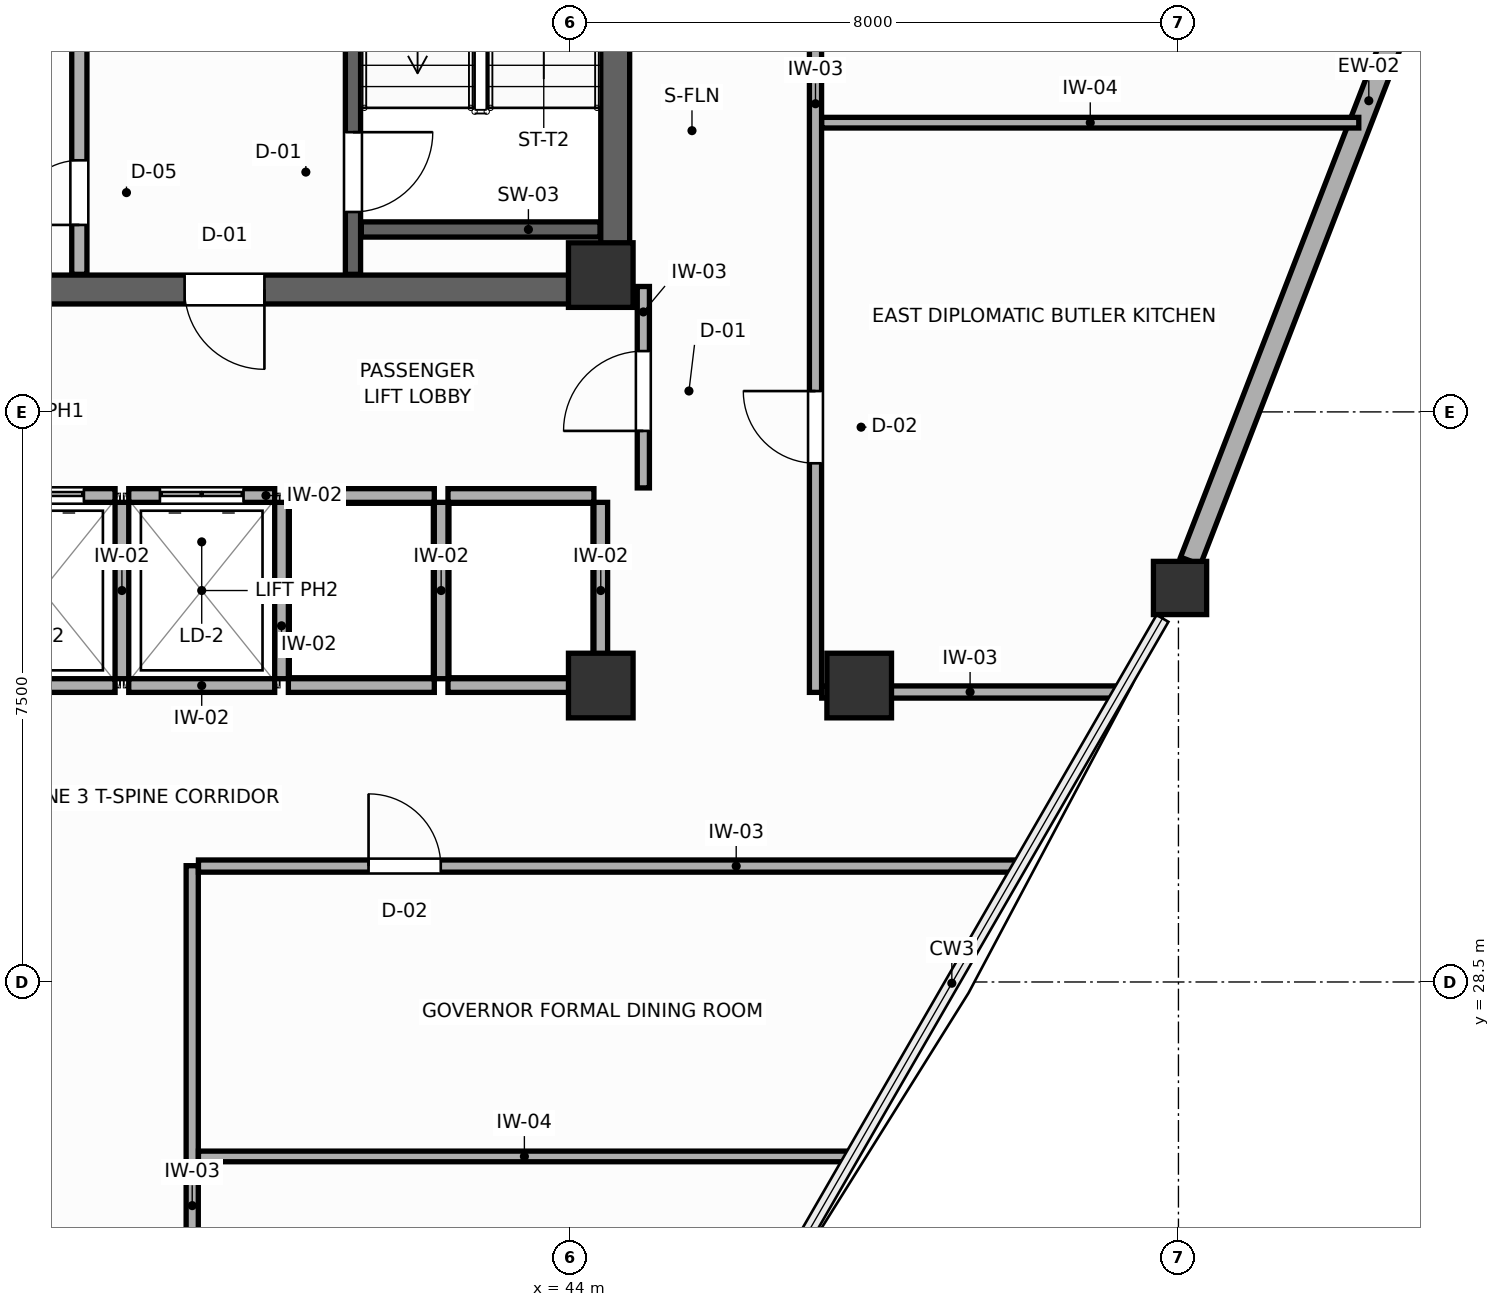
"""IFC4 building model, lengths in metres.
Left out: names, types, materials, properties, quantities, classifications, styles, units other than length and angle.
Written with IfcOpenShell. Run it as: python <this file> out.ifc"""

import sys

from ifc_helpers import new_model, si_unit, direction, frame, frame_2d, origin, origin_2d, place, context, subcontext, project, spatial, rectangle, extrude, source, transform, mapped, element, fill, save


model = new_model("IFC4")
c1 = context("Model", 3, precision=1e-05, world=origin(), true_north=direction((0.0, 1.0)))
c2 = subcontext(c1, "Body", "Model", "MODEL_VIEW")
j1 = project(units=[si_unit("LENGTHUNIT", "METRE"), si_unit("PLANEANGLEUNIT", "RADIAN")], contexts=[c1])
p1 = place(None, origin())
s1 = spatial("IfcSite", under=j1, at=p1, CompositionType="ELEMENT")
p2 = place(p1, origin())
s2 = spatial("IfcBuilding", under=s1, at=p2, CompositionType="ELEMENT")
p3 = place(p2, frame((0.0, 0.0, 250.2)))
s3 = spatial("IfcBuildingStorey", under=s2, at=p3, CompositionType="ELEMENT", Elevation=250.2)
p4 = place(p3, frame((27.22, 37.61, 0.0), z_axis=(0.0, 0.0, 1.0), x_axis=(1.0, 0.0, 0.0)))
e1 = element("IfcWall", 1, at=p4, inside=s3, PredefinedType="SHEAR", context=c2, shape_type="SweptSolid", body=[
    extrude(rectangle(XDim=17.56, YDim=0.38, at=frame_2d((8.78, 0.0))), origin(), (0.0, 0.0, 1.0), 3.6),
])
p5 = place(p4, frame((4.805, 0.0, 0.0)))
e2 = element("IfcOpeningElement", 2, at=p5, cuts=e1, PredefinedType="OPENING", context=c2, shape_type="SweptSolid", body=[
    extrude(rectangle(XDim=1.05, YDim=2.1, at=frame_2d((0.525, 1.05))), frame((0.0, 0.2, 0.0), z_axis=(0.0, -1.0, 0.0), x_axis=(1.0, 0.0, 0.0)), (0.0, 0.0, 1.0), 0.4),
])
p6 = place(p4, frame((11.705, 0.0, 0.0)))
e3 = element("IfcOpeningElement", 3, at=p6, cuts=e1, PredefinedType="OPENING", context=c2, shape_type="SweptSolid", body=[
    extrude(rectangle(XDim=1.05, YDim=2.1, at=frame_2d((0.525, 1.05))), frame((0.0, 0.2, 0.0), z_axis=(0.0, -1.0, 0.0), x_axis=(1.0, 0.0, 0.0)), (0.0, 0.0, 1.0), 0.4),
])
p7 = place(p3, frame((44.59, 37.8, 0.0), z_axis=(0.0, 0.0, 1.0), x_axis=(0.0, 1.0, 0.0)))
e4 = element("IfcWall", 4, at=p7, inside=s3, PredefinedType="SHEAR", context=c2, shape_type="SweptSolid", body=[
    extrude(rectangle(XDim=9.0, YDim=0.38, at=frame_2d((4.5, 0.0))), origin(), (0.0, 0.0, 1.0), 3.6),
])
m1 = source(origin(), c2, "Body", "SweptSolid", [
    extrude(rectangle(XDim=0.85, YDim=0.85, at=origin_2d()), origin(), (0.0, 0.0, 1.0), 3.6),
])
for number, where, z_axis, x_axis in (
    (5, (44.4, 37.8, 0.0), (0.0, 0.0, 1.0), (1.0, 0.0, 0.0)),
    (6, (44.4, 32.4, 0.0), (0.0, 0.0, 1.0), (1.0, 0.0, 0.0)),
    (7, (47.8, 32.4, 0.0), (0.0, 0.0, 1.0), (1.0, 0.0, 0.0)),
):
    element("IfcColumn", number, at=place(p3, frame(where, z_axis=z_axis, x_axis=x_axis)), inside=s3, PredefinedType="COLUMN", context=c2, shape_type="MappedRepresentation", body=[
        mapped(m1, transform((0.0, 0.0, 0.0), scale=1.0)),
    ])
m2 = source(origin(), c2, "Body", "SweptSolid", [
    extrude(rectangle(XDim=0.7, YDim=0.7, at=origin_2d()), origin(), (0.0, 0.0, 1.0), 3.6),
])
p8 = place(p3, frame((52.021, 33.684, 0.0), z_axis=(0.0, 0.0, 1.0), x_axis=(1.0, 0.0, 0.0)))
e8 = element("IfcColumn", 8, at=p8, inside=s3, PredefinedType="COLUMN", context=c2, shape_type="MappedRepresentation", body=[
    mapped(m2, transform((0.0, 0.0, 0.0), scale=1.0)),
])
p9 = place(p3, frame((52.158, 34.039, 0.0), z_axis=(0.0, 0.0, 1.0), x_axis=(0.361269378379, 0.93246149317, 0.0)))
e9 = element("IfcWall", 9, at=p9, inside=s3, PredefinedType="SOLIDWALL", context=c2, shape_type="SweptSolid", body=[
    extrude(rectangle(XDim=12.987, YDim=0.28, at=frame_2d((6.494, 0.0))), origin(), (0.0, 0.0, 1.0), 1.88),
])
p10 = place(p3, frame((41.14, 37.81, 0.0), z_axis=(0.0, 0.0, 1.0), x_axis=(0.0, 1.0, 0.0)))
e10 = element("IfcWall", 10, at=p10, inside=s3, PredefinedType="SHEAR", context=c2, shape_type="SweptSolid", body=[
    extrude(rectangle(XDim=8.98, YDim=0.2, at=frame_2d((4.49, 0.0))), origin(), (0.0, 0.0, 1.0), 3.6),
])
p11 = place(p10, frame((0.82, 0.0, 0.0)))
e11 = element("IfcOpeningElement", 11, at=p11, cuts=e10, PredefinedType="OPENING", context=c2, shape_type="SweptSolid", body=[
    extrude(rectangle(XDim=1.05, YDim=2.1, at=frame_2d((0.525, 1.05))), frame((0.0, 0.11, 0.0), z_axis=(0.0, -1.0, 0.0), x_axis=(1.0, 0.0, 0.0)), (0.0, 0.0, 1.0), 0.22),
])
p12 = place(p3, frame((41.25, 38.4, 0.0), z_axis=(0.0, 0.0, 1.0), x_axis=(1.0, 0.0, 0.0)))
e12 = element("IfcWall", 12, at=p12, inside=s3, PredefinedType="SHEAR", context=c2, shape_type="SweptSolid", body=[
    extrude(rectangle(XDim=3.14, YDim=0.2, at=frame_2d((1.57, 0.0))), origin(), (0.0, 0.0, 1.0), 3.6),
])
p13 = place(p3, frame((37.54, 37.81, 0.0), z_axis=(0.0, 0.0, 1.0), x_axis=(0.0, 1.0, 0.0)))
e13 = element("IfcWall", 13, at=p13, inside=s3, PredefinedType="PARTITIONING", context=c2, shape_type="SweptSolid", body=[
    extrude(rectangle(XDim=8.98, YDim=0.2, at=frame_2d((4.49, 0.0))), origin(), (0.0, 0.0, 1.0), 3.41),
])
p14 = place(p13, frame((0.65, 0.0, 0.0)))
e14 = element("IfcOpeningElement", 14, at=p14, cuts=e13, PredefinedType="OPENING", context=c2, shape_type="SweptSolid", body=[
    extrude(rectangle(XDim=0.85, YDim=2.05, at=frame_2d((0.425, 1.025))), frame((0.0, 0.11, 0.0), z_axis=(0.0, -1.0, 0.0), x_axis=(1.0, 0.0, 0.0)), (0.0, 0.0, 1.0), 0.22),
])
p15 = place(p3, frame((36.09, 34.9, 0.0), z_axis=(0.0, 0.0, 1.0), x_axis=(1.0, 0.0, 0.0)))
e15 = element("IfcWall", 15, at=p15, inside=s3, PredefinedType="PARTITIONING", context=c2, shape_type="SweptSolid", body=[
    extrude(rectangle(XDim=1.92, YDim=0.18, at=frame_2d((0.96, 0.0))), origin(), (0.0, 0.0, 1.0), 3.41),
])
p16 = place(p15, frame((0.41, 0.0, 0.0)))
e16 = element("IfcOpeningElement", 16, at=p16, cuts=e15, PredefinedType="OPENING", context=c2, shape_type="SweptSolid", body=[
    extrude(rectangle(XDim=1.1, YDim=2.1, at=frame_2d((0.55, 1.05))), frame((0.0, 0.1, 0.0), z_axis=(0.0, -1.0, 0.0), x_axis=(1.0, 0.0, 0.0)), (0.0, 0.0, 1.0), 0.2),
])
p17 = place(p3, frame((36.09, 32.4, 0.0), z_axis=(0.0, 0.0, 1.0), x_axis=(1.0, 0.0, 0.0)))
e17 = element("IfcWall", 17, at=p17, inside=s3, PredefinedType="PARTITIONING", context=c2, shape_type="SweptSolid", body=[
    extrude(rectangle(XDim=1.92, YDim=0.18, at=frame_2d((0.96, 0.0))), origin(), (0.0, 0.0, 1.0), 2.17),
])
p18 = place(p3, frame((38.19, 34.9, 0.0), z_axis=(0.0, 0.0, 1.0), x_axis=(1.0, 0.0, 0.0)))
e18 = element("IfcWall", 18, at=p18, inside=s3, PredefinedType="PARTITIONING", context=c2, shape_type="SweptSolid", body=[
    extrude(rectangle(XDim=1.92, YDim=0.18, at=frame_2d((0.96, 0.0))), origin(), (0.0, 0.0, 1.0), 3.41),
])
p19 = place(p18, frame((0.41, 0.0, 0.0)))
e19 = element("IfcOpeningElement", 19, at=p19, cuts=e18, PredefinedType="OPENING", context=c2, shape_type="SweptSolid", body=[
    extrude(rectangle(XDim=1.1, YDim=2.1, at=frame_2d((0.55, 1.05))), frame((0.0, 0.1, 0.0), z_axis=(0.0, -1.0, 0.0), x_axis=(1.0, 0.0, 0.0)), (0.0, 0.0, 1.0), 0.2),
])
p20 = place(p3, frame((38.19, 32.4, 0.0), z_axis=(0.0, 0.0, 1.0), x_axis=(1.0, 0.0, 0.0)))
e20 = element("IfcWall", 20, at=p20, inside=s3, PredefinedType="PARTITIONING", context=c2, shape_type="SweptSolid", body=[
    extrude(rectangle(XDim=1.92, YDim=0.18, at=frame_2d((0.96, 0.0))), origin(), (0.0, 0.0, 1.0), 2.17),
])
p21 = place(p3, frame((38.1, 32.49, 0.0), z_axis=(0.0, 0.0, 1.0), x_axis=(0.0, 1.0, 0.0)))
e21 = element("IfcWall", 21, at=p21, inside=s3, PredefinedType="PARTITIONING", context=c2, shape_type="SweptSolid", body=[
    extrude(rectangle(XDim=2.32, YDim=0.18, at=frame_2d((1.16, 0.0))), origin(), (0.0, 0.0, 1.0), 3.41),
])
p22 = place(p3, frame((40.29, 34.9, 0.0), z_axis=(0.0, 0.0, 1.0), x_axis=(1.0, 0.0, 0.0)))
e22 = element("IfcWall", 22, at=p22, inside=s3, PredefinedType="PARTITIONING", context=c2, shape_type="SweptSolid", body=[
    extrude(rectangle(XDim=1.92, YDim=0.18, at=frame_2d((0.96, 0.0))), origin(), (0.0, 0.0, 1.0), 3.41),
])
p23 = place(p3, frame((40.29, 32.4, 0.0), z_axis=(0.0, 0.0, 1.0), x_axis=(1.0, 0.0, 0.0)))
e23 = element("IfcWall", 23, at=p23, inside=s3, PredefinedType="PARTITIONING", context=c2, shape_type="SweptSolid", body=[
    extrude(rectangle(XDim=1.92, YDim=0.18, at=frame_2d((0.96, 0.0))), origin(), (0.0, 0.0, 1.0), 2.17),
])
p24 = place(p3, frame((40.2, 32.49, 0.0), z_axis=(0.0, 0.0, 1.0), x_axis=(0.0, 1.0, 0.0)))
e24 = element("IfcWall", 24, at=p24, inside=s3, PredefinedType="PARTITIONING", context=c2, shape_type="SweptSolid", body=[
    extrude(rectangle(XDim=2.32, YDim=0.18, at=frame_2d((1.16, 0.0))), origin(), (0.0, 0.0, 1.0), 3.41),
])
p25 = place(p3, frame((42.39, 34.9, 0.0), z_axis=(0.0, 0.0, 1.0), x_axis=(1.0, 0.0, 0.0)))
e25 = element("IfcWall", 25, at=p25, inside=s3, PredefinedType="PARTITIONING", context=c2, shape_type="SweptSolid", body=[
    extrude(rectangle(XDim=1.92, YDim=0.18, at=frame_2d((0.96, 0.0))), origin(), (0.0, 0.0, 1.0), 3.41),
])
p26 = place(p3, frame((42.39, 32.4, 0.0), z_axis=(0.0, 0.0, 1.0), x_axis=(1.0, 0.0, 0.0)))
e26 = element("IfcWall", 26, at=p26, inside=s3, PredefinedType="PARTITIONING", context=c2, shape_type="SweptSolid", body=[
    extrude(rectangle(XDim=1.92, YDim=0.18, at=frame_2d((0.96, 0.0))), origin(), (0.0, 0.0, 1.0), 2.17),
])
for number, where, z_axis, x_axis in (
    (27, (42.3, 32.49, 0.0), (0.0, 0.0, 1.0), (0.0, 1.0, 0.0)),
    (28, (44.4, 32.49, 0.0), (0.0, 0.0, 1.0), (0.0, 1.0, 0.0)),
):
    element("IfcWall", number, at=place(p3, frame(where, z_axis=z_axis, x_axis=x_axis)), inside=s3, PredefinedType="PARTITIONING", context=c2, shape_type="SweptSolid", body=[
        extrude(rectangle(XDim=2.32, YDim=0.18, at=frame_2d((1.16, 0.0))), origin(), (0.0, 0.0, 1.0), 3.41),
    ])
p27 = place(p3, frame((44.96, 35.0, 0.0), z_axis=(0.0, 0.0, 1.0), x_axis=(0.0, 1.0, 0.0)))
e29 = element("IfcWall", 29, at=p27, inside=s3, PredefinedType="PARTITIONING", context=c2, shape_type="SweptSolid", body=[
    extrude(rectangle(XDim=2.65, YDim=0.16, at=frame_2d((1.325, 0.0))), origin(), (0.0, 0.0, 1.0), 3.41),
])
p28 = place(p27, frame((0.75, 0.0, 0.0)))
e30 = element("IfcOpeningElement", 30, at=p28, cuts=e29, PredefinedType="OPENING", context=c2, shape_type="SweptSolid", body=[
    extrude(rectangle(XDim=1.05, YDim=2.1, at=frame_2d((0.525, 1.05))), frame((0.0, 0.09, 0.0), z_axis=(0.0, -1.0, 0.0), x_axis=(1.0, 0.0, 0.0)), (0.0, 0.0, 1.0), 0.18),
])
p29 = place(p3, frame((47.225, 32.31, 0.0), z_axis=(0.0, 0.0, 1.0), x_axis=(0.0, 1.0, 0.0)))
e31 = element("IfcWall", 31, at=p29, inside=s3, PredefinedType="PARTITIONING", context=c2, shape_type="SweptSolid", body=[
    extrude(rectangle(XDim=17.892, YDim=0.16, at=frame_2d((8.946, 0.0))), origin(), (0.0, 0.0, 1.0), 3.41),
])
p30 = place(p29, frame((3.014, 0.0, 0.0)))
e32 = element("IfcOpeningElement", 32, at=p30, cuts=e31, PredefinedType="OPENING", context=c2, shape_type="SweptSolid", body=[
    extrude(rectangle(XDim=0.95, YDim=2.05, at=frame_2d((0.475, 1.025))), frame((0.0, 0.09, 0.0), z_axis=(0.0, -1.0, 0.0), x_axis=(1.0, 0.0, 0.0)), (0.0, 0.0, 1.0), 0.18),
])
p31 = place(p29, frame((11.524, 0.0, 0.0)))
e33 = element("IfcOpeningElement", 33, at=p31, cuts=e31, PredefinedType="OPENING", context=c2, shape_type="SweptSolid", body=[
    extrude(rectangle(XDim=0.95, YDim=2.05, at=frame_2d((0.475, 1.025))), frame((0.0, 0.09, 0.0), z_axis=(0.0, -1.0, 0.0), x_axis=(1.0, 0.0, 0.0)), (0.0, 0.0, 1.0), 0.18),
])
p32 = place(p3, frame((39.025, 14.615, 0.0), z_axis=(0.0, 0.0, 1.0), x_axis=(0.0, 1.0, 0.0)))
e34 = element("IfcWall", 34, at=p32, inside=s3, PredefinedType="PARTITIONING", context=c2, shape_type="SweptSolid", body=[
    extrude(rectangle(XDim=15.415, YDim=0.16, at=frame_2d((7.708, 0.0))), origin(), (0.0, 0.0, 1.0), 3.41),
])
p33 = place(p32, frame((5.341, 0.0, 0.0)))
e35 = element("IfcOpeningElement", 35, at=p33, cuts=e34, PredefinedType="OPENING", context=c2, shape_type="SweptSolid", body=[
    extrude(rectangle(XDim=0.95, YDim=2.05, at=frame_2d((0.475, 1.025))), frame((0.0, 0.09, 0.0), z_axis=(0.0, -1.0, 0.0), x_axis=(1.0, 0.0, 0.0)), (0.0, 0.0, 1.0), 0.18),
])
p34 = place(p3, frame((39.107, 30.025, 0.0), z_axis=(0.0, 0.0, 1.0), x_axis=(1.0, 0.0, 0.0)))
e36 = element("IfcWall", 36, at=p34, inside=s3, PredefinedType="PARTITIONING", context=c2, shape_type="SweptSolid", body=[
    extrude(rectangle(XDim=10.782, YDim=0.16, at=frame_2d((5.391, 0.0))), origin(), (0.0, 0.0, 1.0), 3.41),
])
p35 = place(p34, frame((2.238, 0.0, 0.0)))
e37 = element("IfcOpeningElement", 37, at=p35, cuts=e36, PredefinedType="OPENING", context=c2, shape_type="SweptSolid", body=[
    extrude(rectangle(XDim=0.95, YDim=2.05, at=frame_2d((0.475, 1.025))), frame((0.0, 0.09, 0.0), z_axis=(0.0, -1.0, 0.0), x_axis=(1.0, 0.0, 0.0)), (0.0, 0.0, 1.0), 0.18),
])
p36 = place(p3, frame((47.307, 32.315, 0.0), z_axis=(0.0, 0.0, 1.0), x_axis=(1.0, 0.0, 0.0)))
e38 = element("IfcWall", 38, at=p36, inside=s3, PredefinedType="PARTITIONING", context=c2, shape_type="SweptSolid", body=[
    extrude(rectangle(XDim=3.904, YDim=0.16, at=frame_2d((1.952, 0.0))), origin(), (0.0, 0.0, 1.0), 2.17),
])
p37 = place(p3, frame((39.107, 26.205, 0.0), z_axis=(0.0, 0.0, 1.0), x_axis=(1.0, 0.0, 0.0)))
e39 = element("IfcWall", 39, at=p37, inside=s3, PredefinedType="PARTITIONING", context=c2, shape_type="SweptSolid", body=[
    extrude(rectangle(XDim=8.576, YDim=0.14, at=frame_2d((4.288, 0.0))), origin(), (0.0, 0.0, 1.0), 3.41),
])
p38 = place(p3, frame((47.307, 39.805, 0.0), z_axis=(0.0, 0.0, 1.0), x_axis=(1.0, 0.0, 0.0)))
e40 = element("IfcWall", 40, at=p38, inside=s3, PredefinedType="PARTITIONING", context=c2, shape_type="SweptSolid", body=[
    extrude(rectangle(XDim=7.066, YDim=0.14, at=frame_2d((3.533, 0.0))), origin(), (0.0, 0.0, 1.0), 3.41),
])
p39 = place(p11, frame((1.05, 0.0, 0.0), z_axis=(0.0, 0.0, 1.0), x_axis=(-1.0, 0.0, 0.0)))
e41 = element("IfcDoor", 41, at=p39, inside=s3, OperationType="SINGLE_SWING_LEFT", PredefinedType="DOOR", context=c2, shape_type="SweptSolid", body=[
    extrude(rectangle(XDim=1.05, YDim=2.1, at=frame_2d((0.525, 1.05))), frame((0.0, 0.025, 0.0), z_axis=(0.0, -1.0, 0.0), x_axis=(1.0, 0.0, 0.0)), (0.0, 0.0, 1.0), 0.05),
])
fill(e11, e41)
p40 = place(p14, origin())
e42 = element("IfcDoor", 42, at=p40, inside=s3, OperationType="SINGLE_SWING_LEFT", PredefinedType="DOOR", context=c2, shape_type="SweptSolid", body=[
    extrude(rectangle(XDim=0.85, YDim=2.05, at=frame_2d((0.425, 1.025))), frame((0.0, 0.025, 0.0), z_axis=(0.0, -1.0, 0.0), x_axis=(1.0, 0.0, 0.0)), (0.0, 0.0, 1.0), 0.05),
])
fill(e14, e42)
p41 = place(p16, origin())
e43 = element("IfcDoor", 43, at=p41, inside=s3, OperationType="DOUBLE_DOOR_SLIDING", PredefinedType="DOOR", context=c2, shape_type="SweptSolid", body=[
    extrude(rectangle(XDim=1.1, YDim=2.1, at=frame_2d((0.55, 1.05))), frame((0.0, 0.025, 0.0), z_axis=(0.0, -1.0, 0.0), x_axis=(1.0, 0.0, 0.0)), (0.0, 0.0, 1.0), 0.05),
])
fill(e16, e43)
p42 = place(p19, origin())
e44 = element("IfcDoor", 44, at=p42, inside=s3, OperationType="DOUBLE_DOOR_SLIDING", PredefinedType="DOOR", context=c2, shape_type="SweptSolid", body=[
    extrude(rectangle(XDim=1.1, YDim=2.1, at=frame_2d((0.55, 1.05))), frame((0.0, 0.025, 0.0), z_axis=(0.0, -1.0, 0.0), x_axis=(1.0, 0.0, 0.0)), (0.0, 0.0, 1.0), 0.05),
])
fill(e19, e44)
p43 = place(p28, origin())
e45 = element("IfcDoor", 45, at=p43, inside=s3, OperationType="SINGLE_SWING_LEFT", PredefinedType="DOOR", context=c2, shape_type="SweptSolid", body=[
    extrude(rectangle(XDim=1.05, YDim=2.1, at=frame_2d((0.525, 1.05))), frame((0.0, 0.025, 0.0), z_axis=(0.0, -1.0, 0.0), x_axis=(1.0, 0.0, 0.0)), (0.0, 0.0, 1.0), 0.05),
])
fill(e30, e45)
p44 = place(p30, origin())
e46 = element("IfcDoor", 46, at=p44, inside=s3, OperationType="SINGLE_SWING_RIGHT", PredefinedType="DOOR", context=c2, shape_type="SweptSolid", body=[
    extrude(rectangle(XDim=0.95, YDim=2.05, at=frame_2d((0.475, 1.025))), frame((0.0, 0.025, 0.0), z_axis=(0.0, -1.0, 0.0), x_axis=(1.0, 0.0, 0.0)), (0.0, 0.0, 1.0), 0.05),
])
fill(e32, e46)
p45 = place(p35, origin())
e47 = element("IfcDoor", 47, at=p45, inside=s3, OperationType="SINGLE_SWING_LEFT", PredefinedType="DOOR", context=c2, shape_type="SweptSolid", body=[
    extrude(rectangle(XDim=0.95, YDim=2.05, at=frame_2d((0.475, 1.025))), frame((0.0, 0.025, 0.0), z_axis=(0.0, -1.0, 0.0), x_axis=(1.0, 0.0, 0.0)), (0.0, 0.0, 1.0), 0.05),
])
fill(e37, e47)
p46 = place(p6, frame((1.05, 0.0, 0.0), z_axis=(0.0, 0.0, 1.0), x_axis=(-1.0, 0.0, 0.0)))
e48 = element("IfcDoor", 48, at=p46, inside=s3, OperationType="SINGLE_SWING_LEFT", PredefinedType="DOOR", context=c2, shape_type="SweptSolid", body=[
    extrude(rectangle(XDim=1.05, YDim=2.1, at=frame_2d((0.525, 1.05))), frame((0.0, 0.025, 0.0), z_axis=(0.0, -1.0, 0.0), x_axis=(1.0, 0.0, 0.0)), (0.0, 0.0, 1.0), 0.05),
])
fill(e3, e48)
save(model, sys.argv[1])
